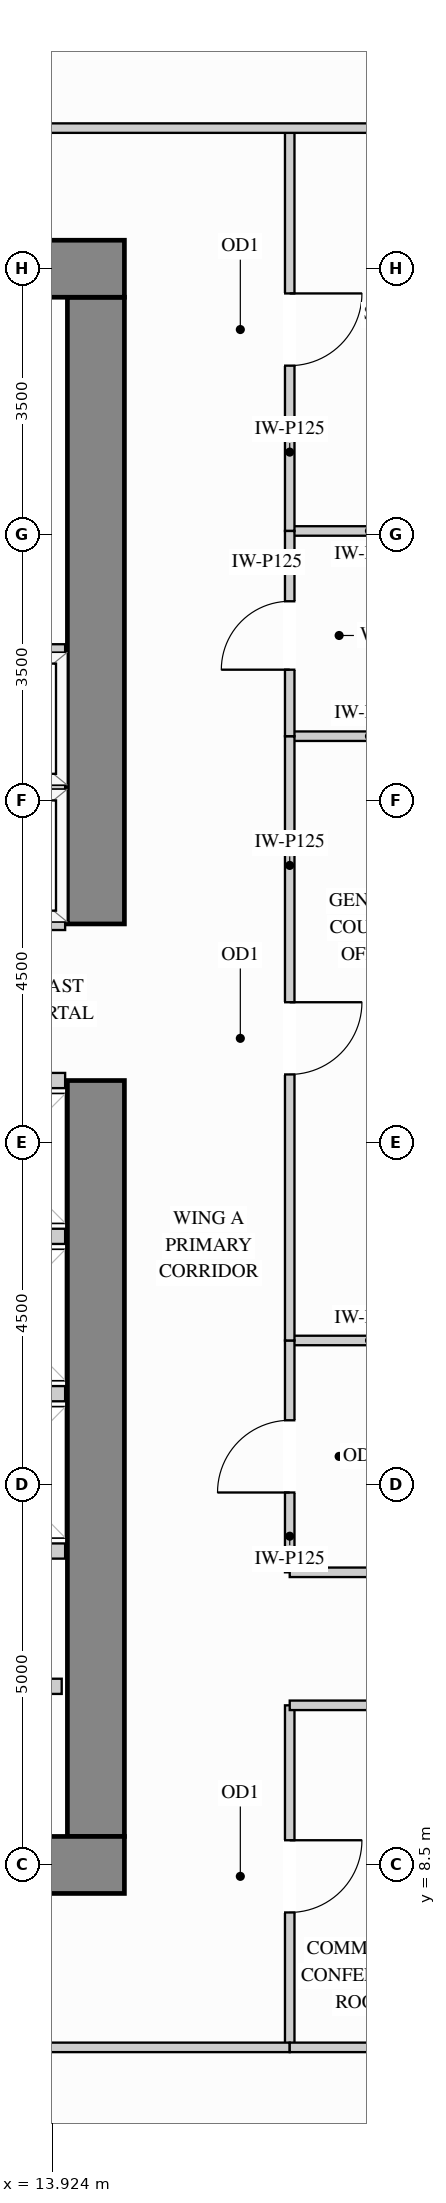
"""IFC4 building model, lengths in metres.
Left out: names, types, materials, properties, quantities, classifications, styles, units other than length and angle.
Written with IfcOpenShell. Run it as: python <this file> out.ifc"""

import sys

from ifc_helpers import new_model, si_unit, direction, frame, frame_2d, origin, place, context, subcontext, project, spatial, rectangle, extrude, source, transform, mapped, element, fill, save


model = new_model("IFC4")
c1 = context("Model", 3, precision=1e-05, world=origin(), true_north=direction((0.0, 1.0)))
c2 = subcontext(c1, "Body", "Model", "MODEL_VIEW")
j1 = project(units=[si_unit("LENGTHUNIT", "METRE"), si_unit("PLANEANGLEUNIT", "RADIAN")], contexts=[c1])
p1 = place(None, origin())
s1 = spatial("IfcSite", under=j1, at=p1, CompositionType="ELEMENT")
p2 = place(p1, origin())
s2 = spatial("IfcBuilding", under=s1, at=p2, CompositionType="ELEMENT")
p3 = place(p2, frame((0.0, 0.0, 113.4)))
s3 = spatial("IfcBuildingStorey", under=s2, at=p3, CompositionType="ELEMENT", Elevation=113.4)
m1 = source(origin(), c2, "Body", "SweptSolid", [
    extrude(rectangle(XDim=9.945, YDim=0.75, at=frame_2d((4.973, 0.0))), origin(), (0.0, 0.0, 1.0), 3.38),
])
p4 = place(p3, frame((14.5, 8.875, 0.0), z_axis=(0.0, 0.0, 1.0), x_axis=(0.0, 1.0, 0.0)))
e1 = element("IfcWall", 1, at=p4, inside=s3, PredefinedType="SHEAR", context=c2, shape_type="MappedRepresentation", body=[
    mapped(m1, transform((0.0, 0.0, 0.0), x_axis=(1.0, 0.0, 0.0), y_axis=(0.0, 1.0, 0.0), z_axis=(0.0, 0.0, 1.0))),
])
m2 = source(origin(), c2, "Body", "SweptSolid", [
    extrude(rectangle(XDim=8.245, YDim=0.75, at=frame_2d((4.123, 0.0))), origin(), (0.0, 0.0, 1.0), 3.38),
])
p5 = place(p3, frame((14.5, 20.88, 0.0), z_axis=(0.0, 0.0, 1.0), x_axis=(0.0, 1.0, 0.0)))
e2 = element("IfcWall", 2, at=p5, inside=s3, PredefinedType="SHEAR", context=c2, shape_type="MappedRepresentation", body=[
    mapped(m2, transform((0.0, 0.0, 0.0), x_axis=(1.0, 0.0, 0.0), y_axis=(0.0, 1.0, 0.0), z_axis=(0.0, 0.0, 1.0))),
])
m3 = source(origin(), c2, "Body", "SweptSolid", [
    extrude(rectangle(XDim=10.75, YDim=0.75, at=frame_2d((5.375, 0.0))), origin(), (0.0, 0.0, 1.0), 3.38),
])
for number, where, z_axis, x_axis in (
    (3, (4.125, 29.5, 0.0), (0.0, 0.0, 1.0), (1.0, 0.0, 0.0)),
    (4, (4.125, 8.5, 0.0), (0.0, 0.0, 1.0), (1.0, 0.0, 0.0)),
):
    element("IfcWall", number, at=place(p3, frame(where, z_axis=z_axis, x_axis=x_axis)), inside=s3, PredefinedType="SHEAR", context=c2, shape_type="MappedRepresentation", body=[
        mapped(m3, transform((0.0, 0.0, 0.0), x_axis=(1.0, 0.0, 0.0), y_axis=(0.0, 1.0, 0.0), z_axis=(0.0, 0.0, 1.0))),
    ])
m4 = source(origin(), c2, "Body", "SweptSolid", [
    extrude(rectangle(XDim=2.1, YDim=0.125, at=frame_2d((1.05, 0.0))), origin(), (0.0, 0.0, 1.0), 3.365),
])
p6 = place(p3, frame((17.05, 15.4, 0.0), z_axis=(0.0, 0.0, 1.0), x_axis=(1.0, 0.0, 0.0)))
e5 = element("IfcWall", 5, at=p6, inside=s3, PredefinedType="PARTITIONING", context=c2, shape_type="MappedRepresentation", body=[
    mapped(m4, transform((0.0, 0.0, 0.0), x_axis=(1.0, 0.0, 0.0), y_axis=(0.0, 1.0, 0.0), z_axis=(0.0, 0.0, 1.0))),
])
m5 = source(origin(), c2, "Body", "SweptSolid", [
    extrude(rectangle(XDim=2.098, YDim=0.125, at=frame_2d((1.049, 0.0))), origin(), (0.0, 0.0, 1.0), 3.365),
])
for number, where, z_axis, x_axis in (
    (6, (17.05, 23.35, 0.0), (0.0, 0.0, 1.0), (1.0, 0.0, 0.0)),
    (7, (17.05, 26.05, 0.0), (0.0, 0.0, 1.0), (1.0, 0.0, 0.0)),
):
    element("IfcWall", number, at=place(p3, frame(where, z_axis=z_axis, x_axis=x_axis)), inside=s3, PredefinedType="PARTITIONING", context=c2, shape_type="MappedRepresentation", body=[
        mapped(m5, transform((0.0, 0.0, 0.0), x_axis=(1.0, 0.0, 0.0), y_axis=(0.0, 1.0, 0.0), z_axis=(0.0, 0.0, 1.0))),
    ])
p7 = place(p3, frame((17.05, 12.35, 0.0), z_axis=(0.0, 0.0, 1.0), x_axis=(0.0, 1.0, 0.0)))
e8 = element("IfcWall", 8, at=p7, inside=s3, PredefinedType="PARTITIONING", context=c2, shape_type="SweptSolid", body=[
    extrude(rectangle(XDim=3.05, YDim=0.125, at=frame_2d((1.525, 0.0))), origin(), (0.0, 0.0, 1.0), 3.365),
])
p8 = place(p7, frame((1.05, 0.0, 0.0)))
e9 = element("IfcOpeningElement", 9, at=p8, cuts=e8, PredefinedType="OPENING", context=c2, shape_type="SweptSolid", body=[
    extrude(rectangle(XDim=0.95, YDim=2.15, at=frame_2d((0.475, 1.075))), frame((0.0, 0.073, 0.0), z_axis=(0.0, -1.0, 0.0), x_axis=(1.0, 0.0, 0.0)), (0.0, 0.0, 1.0), 0.145),
])
p9 = place(p3, frame((17.05, 15.4, 0.0), z_axis=(0.0, 0.0, 1.0), x_axis=(0.0, 1.0, 0.0)))
e10 = element("IfcWall", 10, at=p9, inside=s3, PredefinedType="PARTITIONING", context=c2, shape_type="SweptSolid", body=[
    extrude(rectangle(XDim=7.95, YDim=0.125, at=frame_2d((3.975, 0.0))), origin(), (0.0, 0.0, 1.0), 3.365),
])
p10 = place(p9, frame((3.5, 0.0, 0.0)))
e11 = element("IfcOpeningElement", 11, at=p10, cuts=e10, PredefinedType="OPENING", context=c2, shape_type="SweptSolid", body=[
    extrude(rectangle(XDim=0.95, YDim=2.15, at=frame_2d((0.475, 1.075))), frame((0.0, 0.073, 0.0), z_axis=(0.0, -1.0, 0.0), x_axis=(1.0, 0.0, 0.0)), (0.0, 0.0, 1.0), 0.145),
])
p11 = place(p3, frame((17.05, 26.05, 0.0), z_axis=(0.0, 0.0, 1.0), x_axis=(0.0, 1.0, 0.0)))
e12 = element("IfcWall", 12, at=p11, inside=s3, PredefinedType="PARTITIONING", context=c2, shape_type="SweptSolid", body=[
    extrude(rectangle(XDim=5.3, YDim=0.125, at=frame_2d((2.65, 0.0))), origin(), (0.0, 0.0, 1.0), 3.365),
])
p12 = place(p11, frame((2.175, 0.0, 0.0)))
e13 = element("IfcOpeningElement", 13, at=p12, cuts=e12, PredefinedType="OPENING", context=c2, shape_type="SweptSolid", body=[
    extrude(rectangle(XDim=0.95, YDim=2.15, at=frame_2d((0.475, 1.075))), frame((0.0, 0.073, 0.0), z_axis=(0.0, -1.0, 0.0), x_axis=(1.0, 0.0, 0.0)), (0.0, 0.0, 1.0), 0.145),
])
p13 = place(p3, frame((17.05, 6.1, 0.0), z_axis=(0.0, 0.0, 1.0), x_axis=(0.0, 1.0, 0.0)))
e14 = element("IfcWall", 14, at=p13, inside=s3, PredefinedType="PARTITIONING", context=c2, shape_type="SweptSolid", body=[
    extrude(rectangle(XDim=4.5, YDim=0.125, at=frame_2d((2.25, 0.0))), origin(), (0.0, 0.0, 1.0), 3.365),
])
p14 = place(p13, frame((1.775, 0.0, 0.0)))
e15 = element("IfcOpeningElement", 15, at=p14, cuts=e14, PredefinedType="OPENING", context=c2, shape_type="SweptSolid", body=[
    extrude(rectangle(XDim=0.95, YDim=2.15, at=frame_2d((0.475, 1.075))), frame((0.0, 0.073, 0.0), z_axis=(0.0, -1.0, 0.0), x_axis=(1.0, 0.0, 0.0)), (0.0, 0.0, 1.0), 0.145),
])
p15 = place(p3, frame((17.05, 23.35, 0.0), z_axis=(0.0, 0.0, 1.0), x_axis=(0.0, 1.0, 0.0)))
e16 = element("IfcWall", 16, at=p15, inside=s3, PredefinedType="PARTITIONING", context=c2, shape_type="SweptSolid", body=[
    extrude(rectangle(XDim=2.7, YDim=0.125, at=frame_2d((1.35, 0.0))), origin(), (0.0, 0.0, 1.0), 3.365),
])
p16 = place(p15, frame((0.875, 0.0, 0.0)))
e17 = element("IfcOpeningElement", 17, at=p16, cuts=e16, PredefinedType="OPENING", context=c2, shape_type="SweptSolid", body=[
    extrude(rectangle(XDim=0.9, YDim=2.15, at=frame_2d((0.45, 1.075))), frame((0.0, 0.073, 0.0), z_axis=(0.0, -1.0, 0.0), x_axis=(1.0, 0.0, 0.0)), (0.0, 0.0, 1.0), 0.145),
])
m6 = source(origin(), c2, "Body", "SweptSolid", [
    extrude(rectangle(XDim=5.798, YDim=0.125, at=frame_2d((2.899, 0.0))), origin(), (0.0, 0.0, 1.0), 3.365),
])
p17 = place(p3, frame((13.35, 31.35, 0.0), z_axis=(0.0, 0.0, 1.0), x_axis=(1.0, 0.0, 0.0)))
e18 = element("IfcWall", 18, at=p17, inside=s3, PredefinedType="PARTITIONING", context=c2, shape_type="MappedRepresentation", body=[
    mapped(m6, transform((0.0, 0.0, 0.0), x_axis=(1.0, 0.0, 0.0), y_axis=(0.0, 1.0, 0.0), z_axis=(0.0, 0.0, 1.0))),
])
m7 = source(origin(), c2, "Body", "SweptSolid", [
    extrude(rectangle(XDim=2.45, YDim=0.125, at=frame_2d((1.225, 0.0))), origin(), (0.0, 0.0, 1.0), 3.365),
])
for number, where, z_axis, x_axis in (
    (19, (17.05, 12.35, 0.0), (0.0, 0.0, 1.0), (1.0, 0.0, 0.0)),
    (20, (17.05, 10.6, 0.0), (0.0, 0.0, 1.0), (1.0, 0.0, 0.0)),
):
    element("IfcWall", number, at=place(p3, frame(where, z_axis=z_axis, x_axis=x_axis)), inside=s3, PredefinedType="PARTITIONING", context=c2, shape_type="MappedRepresentation", body=[
        mapped(m7, transform((0.0, 0.0, 0.0), x_axis=(1.0, 0.0, 0.0), y_axis=(0.0, 1.0, 0.0), z_axis=(0.0, 0.0, 1.0))),
    ])
p18 = place(p3, frame((9.551, 6.1, 0.0), z_axis=(0.0, 0.0, 1.0), x_axis=(1.0, 0.0, 0.0)))
e21 = element("IfcWall", 21, at=p18, inside=s3, PredefinedType="PARTITIONING", context=c2, shape_type="SweptSolid", body=[
    extrude(rectangle(XDim=7.499, YDim=0.125, at=frame_2d((3.75, 0.0))), origin(), (0.0, 0.0, 1.0), 3.365),
])
p19 = place(p18, frame((3.274, 0.0, 0.0)))
e22 = element("IfcOpeningElement", 22, at=p19, cuts=e21, PredefinedType="OPENING", context=c2, shape_type="SweptSolid", body=[
    extrude(rectangle(XDim=0.95, YDim=2.15, at=frame_2d((0.475, 1.075))), frame((0.0, 0.073, 0.0), z_axis=(0.0, -1.0, 0.0), x_axis=(1.0, 0.0, 0.0)), (0.0, 0.0, 1.0), 0.145),
])
p20 = place(p3, frame((17.05, 6.1, 0.0), z_axis=(0.0, 0.0, 1.0), x_axis=(1.0, 0.0, 0.0)))
e23 = element("IfcWall", 23, at=p20, inside=s3, PredefinedType="PARTITIONING", context=c2, shape_type="MappedRepresentation", body=[
    mapped(m5, transform((0.0, 0.0, 0.0), x_axis=(1.0, 0.0, 0.0), y_axis=(0.0, 1.0, 0.0), z_axis=(0.0, 0.0, 1.0))),
])
m8 = source(origin(), c2, "Body", "SweptSolid", [
    extrude(rectangle(XDim=1.63, YDim=0.2, at=frame_2d((0.815, 0.0))), origin(), (0.0, 0.0, 1.0), 3.365),
])
p21 = place(p3, frame((12.42, 10.85, 0.0), z_axis=(0.0, 0.0, 1.0), x_axis=(1.0, 0.0, 0.0)))
e24 = element("IfcWall", 24, at=p21, inside=s3, PredefinedType="PARTITIONING", context=c2, shape_type="MappedRepresentation", body=[
    mapped(m8, transform((0.0, 0.0, 0.0), x_axis=(1.0, 0.0, 0.0), y_axis=(0.0, 1.0, 0.0), z_axis=(0.0, 0.0, 1.0))),
])
m9 = source(origin(), c2, "Body", "SweptSolid", [
    extrude(rectangle(XDim=2.265, YDim=0.2, at=frame_2d((1.132, 0.0))), origin(), (0.0, 0.0, 1.0), 3.365),
])
for number, where, z_axis, x_axis in (
    (25, (11.83, 22.66, 0.0), (0.0, 0.0, 1.0), (1.0, 0.0, 0.0)),
    (26, (11.83, 20.9, 0.0), (0.0, 0.0, 1.0), (1.0, 0.0, 0.0)),
    (27, (11.83, 24.46, 0.0), (0.0, 0.0, 1.0), (1.0, 0.0, 0.0)),
):
    element("IfcWall", number, at=place(p3, frame(where, z_axis=z_axis, x_axis=x_axis)), inside=s3, PredefinedType="PARTITIONING", context=c2, shape_type="MappedRepresentation", body=[
        mapped(m9, transform((0.0, 0.0, 0.0), x_axis=(1.0, 0.0, 0.0), y_axis=(0.0, 1.0, 0.0), z_axis=(0.0, 0.0, 1.0))),
    ])
m10 = source(origin(), c2, "Body", "SweptSolid", [
    extrude(rectangle(XDim=1.865, YDim=0.2, at=frame_2d((0.933, 0.0))), origin(), (0.0, 0.0, 1.0), 3.365),
])
for number, where, z_axis, x_axis in (
    (28, (12.23, 14.7, 0.0), (0.0, 0.0, 1.0), (1.0, 0.0, 0.0)),
    (29, (12.23, 12.63, 0.0), (0.0, 0.0, 1.0), (1.0, 0.0, 0.0)),
    (30, (12.23, 16.77, 0.0), (0.0, 0.0, 1.0), (1.0, 0.0, 0.0)),
    (31, (12.23, 18.82, 0.0), (0.0, 0.0, 1.0), (1.0, 0.0, 0.0)),
):
    element("IfcWall", number, at=place(p3, frame(where, z_axis=z_axis, x_axis=x_axis)), inside=s3, PredefinedType="PARTITIONING", context=c2, shape_type="MappedRepresentation", body=[
        mapped(m10, transform((0.0, 0.0, 0.0), x_axis=(1.0, 0.0, 0.0), y_axis=(0.0, 1.0, 0.0), z_axis=(0.0, 0.0, 1.0))),
    ])
m11 = source(origin(), c2, "Body", "SweptSolid", [
    extrude(rectangle(XDim=0.95, YDim=2.15, at=frame_2d((0.475, 1.075))), frame((0.0, 0.025, 0.0), z_axis=(0.0, -1.0, 0.0), x_axis=(1.0, 0.0, 0.0)), (0.0, 0.0, 1.0), 0.05),
])
p22 = place(p14, origin())
e32 = element("IfcDoor", 32, at=p22, inside=s3, OperationType="SINGLE_SWING_RIGHT", PredefinedType="DOOR", context=c2, shape_type="MappedRepresentation", body=[
    mapped(m11, transform((0.0, 0.0, 0.0), x_axis=(1.0, 0.0, 0.0), y_axis=(0.0, 1.0, 0.0), z_axis=(0.0, 0.0, 1.0))),
])
fill(e15, e32)
p23 = place(p8, origin())
e33 = element("IfcDoor", 33, at=p23, inside=s3, OperationType="SINGLE_SWING_LEFT", PredefinedType="DOOR", context=c2, shape_type="MappedRepresentation", body=[
    mapped(m11, transform((0.0, 0.0, 0.0), x_axis=(1.0, 0.0, 0.0), y_axis=(0.0, 1.0, 0.0), z_axis=(0.0, 0.0, 1.0))),
])
fill(e9, e33)
p24 = place(p10, origin())
e34 = element("IfcDoor", 34, at=p24, inside=s3, OperationType="SINGLE_SWING_RIGHT", PredefinedType="DOOR", context=c2, shape_type="MappedRepresentation", body=[
    mapped(m11, transform((0.0, 0.0, 0.0), x_axis=(1.0, 0.0, 0.0), y_axis=(0.0, 1.0, 0.0), z_axis=(0.0, 0.0, 1.0))),
])
fill(e11, e34)
p25 = place(p12, origin())
e35 = element("IfcDoor", 35, at=p25, inside=s3, OperationType="SINGLE_SWING_RIGHT", PredefinedType="DOOR", context=c2, shape_type="MappedRepresentation", body=[
    mapped(m11, transform((0.0, 0.0, 0.0), x_axis=(1.0, 0.0, 0.0), y_axis=(0.0, 1.0, 0.0), z_axis=(0.0, 0.0, 1.0))),
])
fill(e13, e35)
m12 = source(origin(), c2, "Body", "SweptSolid", [
    extrude(rectangle(XDim=0.9, YDim=2.15, at=frame_2d((0.45, 1.075))), frame((0.0, 0.025, 0.0), z_axis=(0.0, -1.0, 0.0), x_axis=(1.0, 0.0, 0.0)), (0.0, 0.0, 1.0), 0.05),
])
p26 = place(p16, origin())
e36 = element("IfcDoor", 36, at=p26, inside=s3, OperationType="SINGLE_SWING_LEFT", PredefinedType="DOOR", context=c2, shape_type="MappedRepresentation", body=[
    mapped(m12, transform((0.0, 0.0, 0.0), x_axis=(1.0, 0.0, 0.0), y_axis=(0.0, 1.0, 0.0), z_axis=(0.0, 0.0, 1.0))),
])
fill(e17, e36)
save(model, sys.argv[1])
